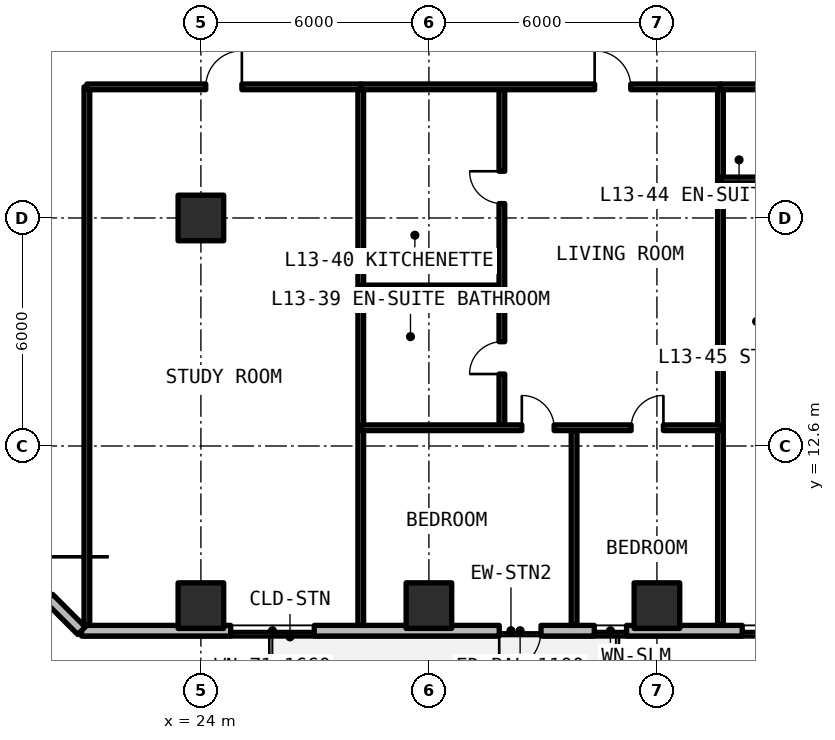
"""IFC4 building model, lengths in metres.
Left out: names, types, materials, properties, quantities, classifications, styles, units other than length and angle.
Written with IfcOpenShell. Run it as: python <this file> out.ifc"""

import sys

from ifc_helpers import new_model, si_unit, direction, frame, frame_2d, origin, origin_2d, place, context, subcontext, project, spatial, rectangle, extrude, element, fill, save


model = new_model("IFC4")
c1 = context("Model", 3, precision=1e-05, world=origin(), true_north=direction((0.0, 1.0)))
c2 = subcontext(c1, "Body", "Model", "MODEL_VIEW")
j1 = project(units=[si_unit("LENGTHUNIT", "METRE"), si_unit("PLANEANGLEUNIT", "RADIAN")], contexts=[c1])
p1 = place(None, origin())
s1 = spatial("IfcSite", under=j1, at=p1, CompositionType="ELEMENT")
p2 = place(p1, origin())
s2 = spatial("IfcBuilding", under=s1, at=p2, CompositionType="ELEMENT")
p3 = place(p2, frame((0.0, 0.0, 48.84)))
s3 = spatial("IfcBuildingStorey", under=s2, at=p3, CompositionType="ELEMENT", Elevation=48.84)
for number, where, z_axis, x_axis in (
    (1, (24.0, 18.6, 0.0), (0.0, 0.0, 1.0), (1.0, 0.0, 0.0)),
    (2, (24.0, 8.4, 0.0), (0.0, 0.0, 1.0), (1.0, 0.0, 0.0)),
    (3, (30.0, 8.4, 0.0), (0.0, 0.0, 1.0), (1.0, 0.0, 0.0)),
    (4, (36.0, 8.4, 0.0), (0.0, 0.0, 1.0), (1.0, 0.0, 0.0)),
):
    element("IfcColumn", number, at=place(p3, frame(where, z_axis=z_axis, x_axis=x_axis)), inside=s3, PredefinedType="COLUMN", context=c2, shape_type="SweptSolid", body=[
        extrude(rectangle(XDim=1.2, YDim=1.2, at=origin_2d()), origin(), (0.0, 0.0, 1.0), 3.3),
    ])
p4 = place(p3, frame((20.858, 7.74, 0.0), z_axis=(0.0, 0.0, 1.0), x_axis=(1.0, 0.0, 0.0)))
e5 = element("IfcWall", 5, at=p4, inside=s3, PredefinedType="SOLIDWALL", context=c2, shape_type="SweptSolid", body=[
    extrude(rectangle(XDim=22.602, YDim=0.28, at=frame_2d((11.301, 0.0))), origin(), (0.0, 0.0, 1.0), 3.08),
])
p5 = place(p4, frame((10.992, 0.0, 0.0)))
e6 = element("IfcOpeningElement", 6, at=p5, cuts=e5, PredefinedType="OPENING", context=c2, shape_type="SweptSolid", body=[
    extrude(rectangle(XDim=1.1, YDim=2.15, at=frame_2d((0.55, 1.075))), frame((0.0, 0.15, 0.0), z_axis=(0.0, -1.0, 0.0), x_axis=(1.0, 0.0, 0.0)), (0.0, 0.0, 1.0), 0.3),
])
p6 = place(p4, frame((3.925, 0.0, 0.78)))
e7 = element("IfcOpeningElement", 7, at=p6, cuts=e5, PredefinedType="OPENING", context=c2, shape_type="SweptSolid", body=[
    extrude(rectangle(XDim=2.2, YDim=1.66, at=frame_2d((1.1, 0.83))), frame((0.0, 0.15, 0.0), z_axis=(0.0, -1.0, 0.0), x_axis=(1.0, 0.0, 0.0)), (0.0, 0.0, 1.0), 0.3),
])
p7 = place(p4, frame((13.493, 0.0, 0.78)))
e8 = element("IfcOpeningElement", 8, at=p7, cuts=e5, PredefinedType="OPENING", context=c2, shape_type="SweptSolid", body=[
    extrude(rectangle(XDim=0.85, YDim=1.65, at=frame_2d((0.425, 0.825))), frame((0.0, 0.15, 0.0), z_axis=(0.0, -1.0, 0.0), x_axis=(1.0, 0.0, 0.0)), (0.0, 0.0, 1.0), 0.3),
])
p8 = place(p4, frame((17.386, 0.0, 0.78)))
e9 = element("IfcOpeningElement", 9, at=p8, cuts=e5, PredefinedType="OPENING", context=c2, shape_type="SweptSolid", body=[
    extrude(rectangle(XDim=0.85, YDim=1.65, at=frame_2d((0.425, 0.825))), frame((0.0, 0.15, 0.0), z_axis=(0.0, -1.0, 0.0), x_axis=(1.0, 0.0, 0.0)), (0.0, 0.0, 1.0), 0.3),
])
p9 = place(p4, frame((19.47, 0.0, 0.78)))
e10 = element("IfcOpeningElement", 10, at=p9, cuts=e5, PredefinedType="OPENING", context=c2, shape_type="SweptSolid", body=[
    extrude(rectangle(XDim=0.85, YDim=1.65, at=frame_2d((0.425, 0.825))), frame((0.0, 0.15, 0.0), z_axis=(0.0, -1.0, 0.0), x_axis=(1.0, 0.0, 0.0)), (0.0, 0.0, 1.0), 0.3),
])
p10 = place(p3, frame((16.74, 11.858, 0.0), z_axis=(0.0, 0.0, 1.0), x_axis=(0.707106781187, -0.707106781187, 0.0)))
e11 = element("IfcWall", 11, at=p10, inside=s3, PredefinedType="SOLIDWALL", context=c2, shape_type="SweptSolid", body=[
    extrude(rectangle(XDim=5.824, YDim=0.28, at=frame_2d((2.912, 0.0))), origin(), (0.0, 0.0, 1.0), 3.08),
])
p11 = place(p10, frame((1.212, 0.0, 0.78)))
e12 = element("IfcOpeningElement", 12, at=p11, cuts=e11, PredefinedType="OPENING", context=c2, shape_type="SweptSolid", body=[
    extrude(rectangle(XDim=3.4, YDim=1.66, at=frame_2d((1.7, 0.83))), frame((0.0, 0.15, 0.0), z_axis=(0.0, -1.0, 0.0), x_axis=(1.0, 0.0, 0.0)), (0.0, 0.0, 1.0), 0.3),
])
for number, where, z_axis, x_axis in (
    (13, (21.0, 7.88, 0.0), (0.0, 0.0, 1.0), (0.0, 1.0, 0.0)),
    (14, (28.207, 7.88, 0.0), (0.0, 0.0, 1.0), (0.0, 1.0, 0.0)),
):
    element("IfcWall", number, at=place(p3, frame(where, z_axis=z_axis, x_axis=x_axis)), inside=s3, PredefinedType="SOLIDWALL", context=c2, shape_type="SweptSolid", body=[
        extrude(rectangle(XDim=14.17, YDim=0.15, at=frame_2d((7.085, 0.0))), origin(), (0.0, 0.0, 1.0), 2.35),
    ])
p12 = place(p3, frame((21.0, 22.05, 0.0), z_axis=(0.0, 0.0, 1.0), x_axis=(1.0, 0.0, 0.0)))
e15 = element("IfcWall", 15, at=p12, inside=s3, PredefinedType="SOLIDWALL", context=c2, shape_type="SweptSolid", body=[
    extrude(rectangle(XDim=7.207, YDim=0.15, at=frame_2d((3.603, 0.0))), origin(), (0.0, 0.0, 1.0), 2.35),
])
p13 = place(p12, frame((3.128, 0.0, 0.0)))
e16 = element("IfcOpeningElement", 16, at=p13, cuts=e15, PredefinedType="OPENING", context=c2, shape_type="SweptSolid", body=[
    extrude(rectangle(XDim=0.95, YDim=2.15, at=frame_2d((0.475, 1.075))), frame((0.0, 0.085, 0.0), z_axis=(0.0, -1.0, 0.0), x_axis=(1.0, 0.0, 0.0)), (0.0, 0.0, 1.0), 0.17),
])
p14 = place(p3, frame((37.672, 7.88, 0.0), z_axis=(0.0, 0.0, 1.0), x_axis=(0.0, 1.0, 0.0)))
e17 = element("IfcWall", 17, at=p14, inside=s3, PredefinedType="SOLIDWALL", context=c2, shape_type="SweptSolid", body=[
    extrude(rectangle(XDim=14.17, YDim=0.15, at=frame_2d((7.085, 0.0))), origin(), (0.0, 0.0, 1.0), 2.35),
])
p15 = place(p3, frame((28.207, 16.758, 0.0), z_axis=(0.0, 0.0, 1.0), x_axis=(1.0, 0.0, 0.0)))
e18 = element("IfcWall", 18, at=p15, inside=s3, PredefinedType="PARTITIONING", context=c2, shape_type="SweptSolid", body=[
    extrude(rectangle(XDim=3.713, YDim=0.15, at=frame_2d((1.857, 0.0))), origin(), (0.0, 0.0, 1.0), 2.35),
])
p16 = place(p3, frame((31.92, 13.08, 0.0), z_axis=(0.0, 0.0, 1.0), x_axis=(0.0, 1.0, 0.0)))
e19 = element("IfcWall", 19, at=p16, inside=s3, PredefinedType="PARTITIONING", context=c2, shape_type="SweptSolid", body=[
    extrude(rectangle(XDim=8.97, YDim=0.15, at=frame_2d((4.485, 0.0))), origin(), (0.0, 0.0, 1.0), 2.35),
])
p17 = place(p16, frame((1.414, 0.0, 0.0)))
e20 = element("IfcOpeningElement", 20, at=p17, cuts=e19, PredefinedType="OPENING", context=c2, shape_type="SweptSolid", body=[
    extrude(rectangle(XDim=0.85, YDim=2.1, at=frame_2d((0.425, 1.05))), frame((0.0, 0.085, 0.0), z_axis=(0.0, -1.0, 0.0), x_axis=(1.0, 0.0, 0.0)), (0.0, 0.0, 1.0), 0.17),
])
p18 = place(p16, frame((5.899, 0.0, 0.0)))
e21 = element("IfcOpeningElement", 21, at=p18, cuts=e19, PredefinedType="OPENING", context=c2, shape_type="SweptSolid", body=[
    extrude(rectangle(XDim=0.85, YDim=2.1, at=frame_2d((0.425, 1.05))), frame((0.0, 0.085, 0.0), z_axis=(0.0, -1.0, 0.0), x_axis=(1.0, 0.0, 0.0)), (0.0, 0.0, 1.0), 0.17),
])
p19 = place(p3, frame((33.82, 7.88, 0.0), z_axis=(0.0, 0.0, 1.0), x_axis=(0.0, 1.0, 0.0)))
e22 = element("IfcWall", 22, at=p19, inside=s3, PredefinedType="PARTITIONING", context=c2, shape_type="SweptSolid", body=[
    extrude(rectangle(XDim=5.2, YDim=0.15, at=frame_2d((2.6, 0.0))), origin(), (0.0, 0.0, 1.0), 2.35),
])
p20 = place(p3, frame((28.207, 13.08, 0.0), z_axis=(0.0, 0.0, 1.0), x_axis=(1.0, 0.0, 0.0)))
e23 = element("IfcWall", 23, at=p20, inside=s3, PredefinedType="PARTITIONING", context=c2, shape_type="SweptSolid", body=[
    extrude(rectangle(XDim=9.465, YDim=0.15, at=frame_2d((4.733, 0.0))), origin(), (0.0, 0.0, 1.0), 2.35),
])
p21 = place(p20, frame((4.239, 0.0, 0.0)))
e24 = element("IfcOpeningElement", 24, at=p21, cuts=e23, PredefinedType="OPENING", context=c2, shape_type="SweptSolid", body=[
    extrude(rectangle(XDim=0.85, YDim=2.1, at=frame_2d((0.425, 1.05))), frame((0.0, 0.085, 0.0), z_axis=(0.0, -1.0, 0.0), x_axis=(1.0, 0.0, 0.0)), (0.0, 0.0, 1.0), 0.17),
])
p22 = place(p20, frame((7.115, 0.0, 0.0)))
e25 = element("IfcOpeningElement", 25, at=p22, cuts=e23, PredefinedType="OPENING", context=c2, shape_type="SweptSolid", body=[
    extrude(rectangle(XDim=0.85, YDim=2.1, at=frame_2d((0.425, 1.05))), frame((0.0, 0.085, 0.0), z_axis=(0.0, -1.0, 0.0), x_axis=(1.0, 0.0, 0.0)), (0.0, 0.0, 1.0), 0.17),
])
p23 = place(p3, frame((28.207, 22.05, 0.0), z_axis=(0.0, 0.0, 1.0), x_axis=(1.0, 0.0, 0.0)))
e26 = element("IfcWall", 26, at=p23, inside=s3, PredefinedType="SOLIDWALL", context=c2, shape_type="SweptSolid", body=[
    extrude(rectangle(XDim=9.465, YDim=0.15, at=frame_2d((4.733, 0.0))), origin(), (0.0, 0.0, 1.0), 2.35),
])
p24 = place(p23, frame((6.154, 0.0, 0.0)))
e27 = element("IfcOpeningElement", 27, at=p24, cuts=e26, PredefinedType="OPENING", context=c2, shape_type="SweptSolid", body=[
    extrude(rectangle(XDim=0.95, YDim=2.15, at=frame_2d((0.475, 1.075))), frame((0.0, 0.085, 0.0), z_axis=(0.0, -1.0, 0.0), x_axis=(1.0, 0.0, 0.0)), (0.0, 0.0, 1.0), 0.17),
])
p25 = place(p3, frame((37.672, 19.6, 0.0), z_axis=(0.0, 0.0, 1.0), x_axis=(1.0, 0.0, 0.0)))
e28 = element("IfcWall", 28, at=p25, inside=s3, PredefinedType="PARTITIONING", context=c2, shape_type="SweptSolid", body=[
    extrude(rectangle(XDim=1.975, YDim=0.15, at=frame_2d((0.987, 0.0))), origin(), (0.0, 0.0, 1.0), 2.35),
])
p26 = place(p3, frame((37.672, 22.05, 0.0), z_axis=(0.0, 0.0, 1.0), x_axis=(1.0, 0.0, 0.0)))
e29 = element("IfcWall", 29, at=p26, inside=s3, PredefinedType="SOLIDWALL", context=c2, shape_type="SweptSolid", body=[
    extrude(rectangle(XDim=5.808, YDim=0.15, at=frame_2d((2.904, 0.0))), origin(), (0.0, 0.0, 1.0), 2.35),
])
p27 = place(p26, frame((3.457, 0.0, 0.0)))
e30 = element("IfcOpeningElement", 30, at=p27, cuts=e29, PredefinedType="OPENING", context=c2, shape_type="SweptSolid", body=[
    extrude(rectangle(XDim=0.95, YDim=2.15, at=frame_2d((0.475, 1.075))), frame((0.0, 0.085, 0.0), z_axis=(0.0, -1.0, 0.0), x_axis=(1.0, 0.0, 0.0)), (0.0, 0.0, 1.0), 0.17),
])
p28 = place(p5, frame((1.1, 0.0, 0.0), z_axis=(0.0, 0.0, 1.0), x_axis=(-1.0, 0.0, 0.0)))
e31 = element("IfcDoor", 31, at=p28, inside=s3, OperationType="SINGLE_SWING_RIGHT", PredefinedType="DOOR", context=c2, shape_type="SweptSolid", body=[
    extrude(rectangle(XDim=1.1, YDim=2.15, at=frame_2d((0.55, 1.075))), frame((0.0, 0.025, 0.0), z_axis=(0.0, -1.0, 0.0), x_axis=(1.0, 0.0, 0.0)), (0.0, 0.0, 1.0), 0.05),
])
fill(e6, e31)
p29 = place(p6, origin())
e32 = element("IfcWindow", 32, at=p29, inside=s3, PartitioningType="SINGLE_PANEL", PredefinedType="WINDOW", context=c2, shape_type="SweptSolid", body=[
    extrude(rectangle(XDim=2.2, YDim=1.66, at=frame_2d((1.1, 0.83))), frame((0.0, 0.03, 0.0), z_axis=(0.0, -1.0, 0.0), x_axis=(1.0, 0.0, 0.0)), (0.0, 0.0, 1.0), 0.06),
])
fill(e7, e32)
p30 = place(p7, origin())
e33 = element("IfcWindow", 33, at=p30, inside=s3, PartitioningType="SINGLE_PANEL", PredefinedType="WINDOW", context=c2, shape_type="SweptSolid", body=[
    extrude(rectangle(XDim=0.85, YDim=1.65, at=frame_2d((0.425, 0.825))), frame((0.0, 0.03, 0.0), z_axis=(0.0, -1.0, 0.0), x_axis=(1.0, 0.0, 0.0)), (0.0, 0.0, 1.0), 0.06),
])
fill(e8, e33)
p31 = place(p8, origin())
e34 = element("IfcWindow", 34, at=p31, inside=s3, PartitioningType="SINGLE_PANEL", PredefinedType="WINDOW", context=c2, shape_type="SweptSolid", body=[
    extrude(rectangle(XDim=0.85, YDim=1.65, at=frame_2d((0.425, 0.825))), frame((0.0, 0.03, 0.0), z_axis=(0.0, -1.0, 0.0), x_axis=(1.0, 0.0, 0.0)), (0.0, 0.0, 1.0), 0.06),
])
fill(e9, e34)
p32 = place(p13, origin())
e35 = element("IfcDoor", 35, at=p32, inside=s3, OperationType="SINGLE_SWING_RIGHT", PredefinedType="DOOR", context=c2, shape_type="SweptSolid", body=[
    extrude(rectangle(XDim=0.95, YDim=2.15, at=frame_2d((0.475, 1.075))), frame((0.0, 0.025, 0.0), z_axis=(0.0, -1.0, 0.0), x_axis=(1.0, 0.0, 0.0)), (0.0, 0.0, 1.0), 0.05),
])
fill(e16, e35)
p33 = place(p17, origin())
e36 = element("IfcDoor", 36, at=p33, inside=s3, OperationType="SINGLE_SWING_LEFT", PredefinedType="DOOR", context=c2, shape_type="SweptSolid", body=[
    extrude(rectangle(XDim=0.85, YDim=2.1, at=frame_2d((0.425, 1.05))), frame((0.0, 0.025, 0.0), z_axis=(0.0, -1.0, 0.0), x_axis=(1.0, 0.0, 0.0)), (0.0, 0.0, 1.0), 0.05),
])
fill(e20, e36)
p34 = place(p18, origin())
e37 = element("IfcDoor", 37, at=p34, inside=s3, OperationType="SINGLE_SWING_RIGHT", PredefinedType="DOOR", context=c2, shape_type="SweptSolid", body=[
    extrude(rectangle(XDim=0.85, YDim=2.1, at=frame_2d((0.425, 1.05))), frame((0.0, 0.025, 0.0), z_axis=(0.0, -1.0, 0.0), x_axis=(1.0, 0.0, 0.0)), (0.0, 0.0, 1.0), 0.05),
])
fill(e21, e37)
p35 = place(p21, origin())
e38 = element("IfcDoor", 38, at=p35, inside=s3, OperationType="SINGLE_SWING_LEFT", PredefinedType="DOOR", context=c2, shape_type="SweptSolid", body=[
    extrude(rectangle(XDim=0.85, YDim=2.1, at=frame_2d((0.425, 1.05))), frame((0.0, 0.025, 0.0), z_axis=(0.0, -1.0, 0.0), x_axis=(1.0, 0.0, 0.0)), (0.0, 0.0, 1.0), 0.05),
])
fill(e24, e38)
p36 = place(p22, origin())
e39 = element("IfcDoor", 39, at=p36, inside=s3, OperationType="SINGLE_SWING_RIGHT", PredefinedType="DOOR", context=c2, shape_type="SweptSolid", body=[
    extrude(rectangle(XDim=0.85, YDim=2.1, at=frame_2d((0.425, 1.05))), frame((0.0, 0.025, 0.0), z_axis=(0.0, -1.0, 0.0), x_axis=(1.0, 0.0, 0.0)), (0.0, 0.0, 1.0), 0.05),
])
fill(e25, e39)
p37 = place(p24, origin())
e40 = element("IfcDoor", 40, at=p37, inside=s3, OperationType="SINGLE_SWING_LEFT", PredefinedType="DOOR", context=c2, shape_type="SweptSolid", body=[
    extrude(rectangle(XDim=0.95, YDim=2.15, at=frame_2d((0.475, 1.075))), frame((0.0, 0.025, 0.0), z_axis=(0.0, -1.0, 0.0), x_axis=(1.0, 0.0, 0.0)), (0.0, 0.0, 1.0), 0.05),
])
fill(e27, e40)
save(model, sys.argv[1])
